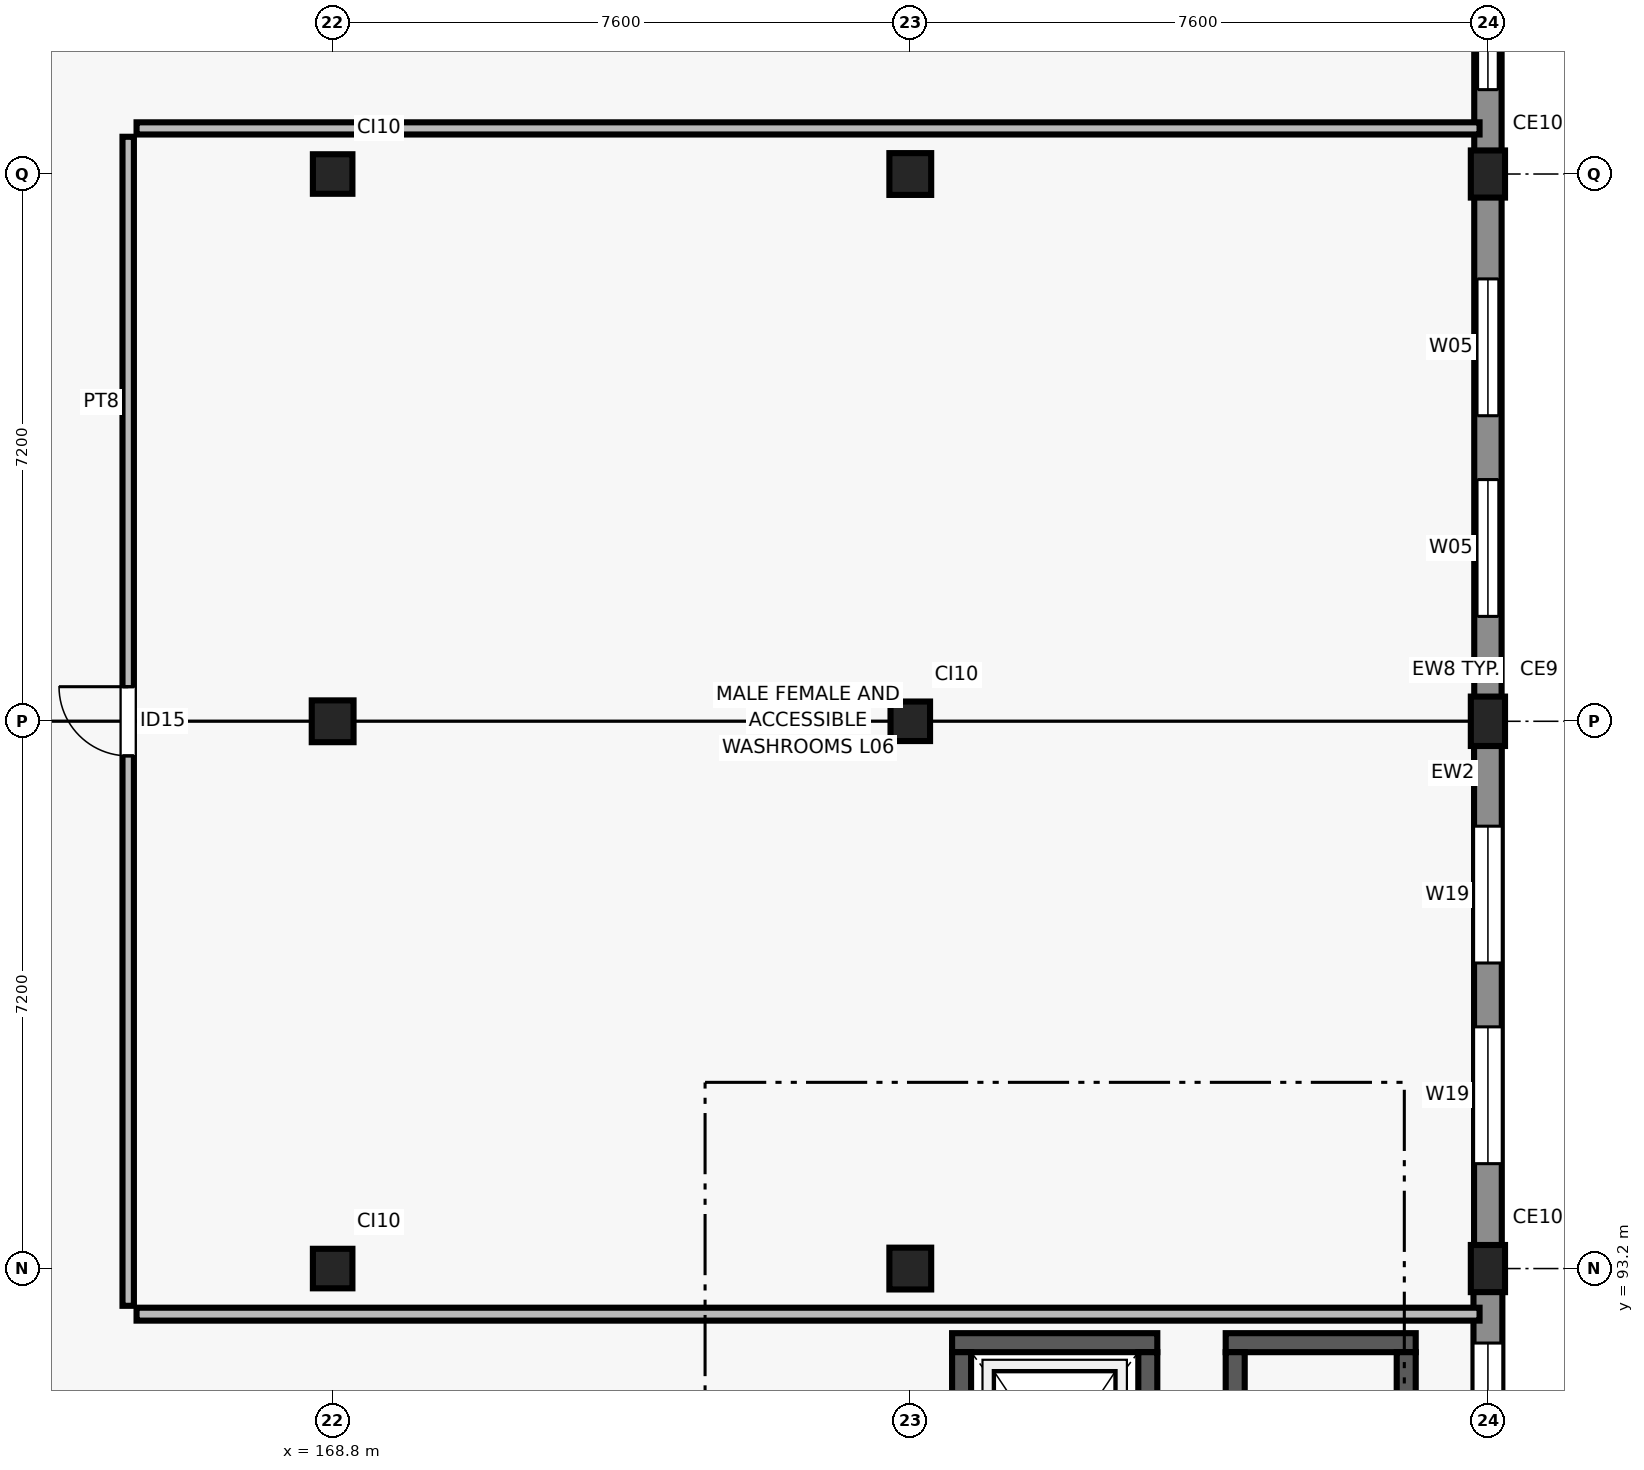
"""IFC4 building model, lengths in metres.
Left out: names, types, materials, properties, quantities, classifications, styles, units other than length and angle.
Written with IfcOpenShell. Run it as: python <this file> out.ifc"""

import sys

from ifc_helpers import new_model, si_unit, direction, frame, frame_2d, origin, origin_2d, place, context, subcontext, project, spatial, polyline, rectangle, outline, extrude, element, fill, save


model = new_model("IFC4")
c1 = context("Model", 3, precision=1e-05, world=origin(), true_north=direction((0.0, 1.0)))
c2 = subcontext(c1, "Body", "Model", "MODEL_VIEW")
j1 = project(units=[si_unit("LENGTHUNIT", "METRE"), si_unit("PLANEANGLEUNIT", "RADIAN")], contexts=[c1])
p1 = place(None, origin())
s1 = spatial("IfcSite", under=j1, at=p1, CompositionType="ELEMENT")
p2 = place(p1, origin())
s2 = spatial("IfcBuilding", under=s1, at=p2, CompositionType="ELEMENT")
p3 = place(p2, frame((0.0, 0.0, 25.8)))
s3 = spatial("IfcBuildingStorey", under=s2, at=p3, CompositionType="ELEMENT", Elevation=25.8)
p4 = place(p3, frame((168.8, 93.2, 0.0), z_axis=(0.0, 0.0, 1.0), x_axis=(1.0, 0.0, 0.0)))
e1 = element("IfcColumn", 1, at=p4, inside=s3, PredefinedType="COLUMN", context=c2, shape_type="SweptSolid", body=[
    extrude(rectangle(XDim=0.52, YDim=0.52, at=origin_2d()), origin(), (0.0, 0.0, 1.0), 4.2),
])
p5 = place(p3, frame((168.8, 100.4, 0.0), z_axis=(0.0, 0.0, 1.0), x_axis=(1.0, 0.0, 0.0)))
e2 = element("IfcColumn", 2, at=p5, inside=s3, PredefinedType="COLUMN", context=c2, shape_type="SweptSolid", body=[
    extrude(rectangle(XDim=0.55, YDim=0.55, at=origin_2d()), origin(), (0.0, 0.0, 1.0), 4.2),
])
p6 = place(p3, frame((168.8, 107.6, 0.0), z_axis=(0.0, 0.0, 1.0), x_axis=(1.0, 0.0, 0.0)))
e3 = element("IfcColumn", 3, at=p6, inside=s3, PredefinedType="COLUMN", context=c2, shape_type="SweptSolid", body=[
    extrude(rectangle(XDim=0.52, YDim=0.52, at=origin_2d()), origin(), (0.0, 0.0, 1.0), 4.2),
])
p7 = place(p3, frame((176.4, 93.2, 0.0), z_axis=(0.0, 0.0, 1.0), x_axis=(1.0, 0.0, 0.0)))
e4 = element("IfcColumn", 4, at=p7, inside=s3, PredefinedType="COLUMN", context=c2, shape_type="SweptSolid", body=[
    extrude(rectangle(XDim=0.55, YDim=0.55, at=origin_2d()), origin(), (0.0, 0.0, 1.0), 4.2),
])
p8 = place(p3, frame((176.4, 100.4, 0.0), z_axis=(0.0, 0.0, 1.0), x_axis=(1.0, 0.0, 0.0)))
e5 = element("IfcColumn", 5, at=p8, inside=s3, PredefinedType="COLUMN", context=c2, shape_type="SweptSolid", body=[
    extrude(rectangle(XDim=0.52, YDim=0.52, at=origin_2d()), origin(), (0.0, 0.0, 1.0), 4.2),
])
p9 = place(p3, frame((176.4, 107.6, 0.0), z_axis=(0.0, 0.0, 1.0), x_axis=(1.0, 0.0, 0.0)))
e6 = element("IfcColumn", 6, at=p9, inside=s3, PredefinedType="COLUMN", context=c2, shape_type="SweptSolid", body=[
    extrude(rectangle(XDim=0.55, YDim=0.55, at=origin_2d()), origin(), (0.0, 0.0, 1.0), 4.2),
])
p10 = place(p3, frame((184.0, 93.2, 0.0), z_axis=(0.0, 0.0, 1.0), x_axis=(1.0, 0.0, 0.0)))
e7 = element("IfcColumn", 7, at=p10, inside=s3, PredefinedType="COLUMN", context=c2, shape_type="SweptSolid", body=[
    extrude(rectangle(XDim=0.62, YDim=0.45, at=origin_2d()), origin(), (0.0, 0.0, 1.0), 4.2),
])
p11 = place(p3, frame((184.0, 100.4, 0.0), z_axis=(0.0, 0.0, 1.0), x_axis=(1.0, 0.0, 0.0)))
e8 = element("IfcColumn", 8, at=p11, inside=s3, PredefinedType="COLUMN", context=c2, shape_type="SweptSolid", body=[
    extrude(rectangle(XDim=0.65, YDim=0.45, at=origin_2d()), origin(), (0.0, 0.0, 1.0), 4.2),
])
p12 = place(p3, frame((184.0, 107.6, 0.0), z_axis=(0.0, 0.0, 1.0), x_axis=(1.0, 0.0, 0.0)))
e9 = element("IfcColumn", 9, at=p12, inside=s3, PredefinedType="COLUMN", context=c2, shape_type="SweptSolid", body=[
    extrude(rectangle(XDim=0.62, YDim=0.45, at=origin_2d()), origin(), (0.0, 0.0, 1.0), 4.2),
])
p13 = place(p3, frame((184.0, 100.62, 0.0), z_axis=(0.0, 0.0, 1.0), x_axis=(0.0, 1.0, 0.0)))
e10 = element("IfcWall", 10, at=p13, inside=s3, PredefinedType="SOLIDWALL", context=c2, shape_type="SweptSolid", body=[
    extrude(rectangle(XDim=6.76, YDim=0.275, at=frame_2d((3.38, 0.0))), origin(), (0.0, 0.0, 1.0), 3.355),
])
p14 = place(p13, frame((1.16, 0.0, 0.9)))
e11 = element("IfcOpeningElement", 11, at=p14, cuts=e10, PredefinedType="OPENING", context=c2, shape_type="SweptSolid", body=[
    extrude(rectangle(XDim=1.8, YDim=1.8, at=frame_2d((0.9, 0.9))), frame((0.0, 0.147, 0.0), z_axis=(0.0, -1.0, 0.0), x_axis=(1.0, 0.0, 0.0)), (0.0, 0.0, 1.0), 0.295),
])
p15 = place(p13, frame((3.8, 0.0, 0.9)))
e12 = element("IfcOpeningElement", 12, at=p15, cuts=e10, PredefinedType="OPENING", context=c2, shape_type="SweptSolid", body=[
    extrude(rectangle(XDim=1.8, YDim=1.8, at=frame_2d((0.9, 0.9))), frame((0.0, 0.147, 0.0), z_axis=(0.0, -1.0, 0.0), x_axis=(1.0, 0.0, 0.0)), (0.0, 0.0, 1.0), 0.295),
])
p16 = place(p3, frame((184.0, 107.82, 0.0), z_axis=(0.0, 0.0, 1.0), x_axis=(0.0, 1.0, 0.0)))
e13 = element("IfcWall", 13, at=p16, inside=s3, PredefinedType="SOLIDWALL", context=c2, shape_type="SweptSolid", body=[
    extrude(rectangle(XDim=6.76, YDim=0.26, at=frame_2d((3.38, 0.0))), origin(), (0.0, 0.0, 1.0), 3.395),
])
p17 = place(p16, frame((0.89, 0.0, 0.9)))
e14 = element("IfcOpeningElement", 14, at=p17, cuts=e13, PredefinedType="OPENING", context=c2, shape_type="SweptSolid", body=[
    extrude(rectangle(XDim=1.4, YDim=1.8, at=frame_2d((0.7, 0.9))), frame((0.0, 0.14, 0.0), z_axis=(0.0, -1.0, 0.0), x_axis=(1.0, 0.0, 0.0)), (0.0, 0.0, 1.0), 0.28),
])
p18 = place(p16, frame((4.37, 0.0, 0.9)))
e15 = element("IfcOpeningElement", 15, at=p18, cuts=e13, PredefinedType="OPENING", context=c2, shape_type="SweptSolid", body=[
    extrude(rectangle(XDim=1.2, YDim=1.8, at=frame_2d((0.6, 0.9))), frame((0.0, 0.14, 0.0), z_axis=(0.0, -1.0, 0.0), x_axis=(1.0, 0.0, 0.0)), (0.0, 0.0, 1.0), 0.28),
])
p19 = place(p3, frame((184.0, 86.22, 0.0), z_axis=(0.0, 0.0, 1.0), x_axis=(0.0, 1.0, 0.0)))
e16 = element("IfcWall", 16, at=p19, inside=s3, PredefinedType="SOLIDWALL", context=c2, shape_type="SweptSolid", body=[
    extrude(rectangle(XDim=6.76, YDim=0.38, at=frame_2d((3.38, 0.0))), origin(), (0.0, 0.0, 1.0), 3.515),
])
p20 = place(p19, frame((0.76, 0.0, 0.9)))
e17 = element("IfcOpeningElement", 17, at=p20, cuts=e16, PredefinedType="OPENING", context=c2, shape_type="SweptSolid", body=[
    extrude(rectangle(XDim=2.4, YDim=1.25, at=frame_2d((1.2, 0.625))), frame((0.0, 0.2, 0.0), z_axis=(0.0, -1.0, 0.0), x_axis=(1.0, 0.0, 0.0)), (0.0, 0.0, 1.0), 0.4),
])
p21 = place(p19, frame((3.6, 0.0, 0.9)))
e18 = element("IfcOpeningElement", 18, at=p21, cuts=e16, PredefinedType="OPENING", context=c2, shape_type="SweptSolid", body=[
    extrude(rectangle(XDim=2.4, YDim=1.25, at=frame_2d((1.2, 0.625))), frame((0.0, 0.2, 0.0), z_axis=(0.0, -1.0, 0.0), x_axis=(1.0, 0.0, 0.0)), (0.0, 0.0, 1.0), 0.4),
])
p22 = place(p3, frame((184.0, 93.42, 0.0), z_axis=(0.0, 0.0, 1.0), x_axis=(0.0, 1.0, 0.0)))
e19 = element("IfcWall", 19, at=p22, inside=s3, PredefinedType="SOLIDWALL", context=c2, shape_type="SweptSolid", body=[
    extrude(rectangle(XDim=6.76, YDim=0.365, at=frame_2d((3.38, 0.0))), origin(), (0.0, 0.0, 1.0), 3.535),
])
p23 = place(p22, frame((1.16, 0.0, 0.9)))
e20 = element("IfcOpeningElement", 20, at=p23, cuts=e19, PredefinedType="OPENING", context=c2, shape_type="SweptSolid", body=[
    extrude(rectangle(XDim=1.8, YDim=1.25, at=frame_2d((0.9, 0.625))), frame((0.0, 0.192, 0.0), z_axis=(0.0, -1.0, 0.0), x_axis=(1.0, 0.0, 0.0)), (0.0, 0.0, 1.0), 0.385),
])
p24 = place(p22, frame((3.8, 0.0, 0.9)))
e21 = element("IfcOpeningElement", 21, at=p24, cuts=e19, PredefinedType="OPENING", context=c2, shape_type="SweptSolid", body=[
    extrude(rectangle(XDim=1.8, YDim=1.25, at=frame_2d((0.9, 0.625))), frame((0.0, 0.192, 0.0), z_axis=(0.0, -1.0, 0.0), x_axis=(1.0, 0.0, 0.0)), (0.0, 0.0, 1.0), 0.385),
])
p25 = place(p3, frame((184.0, 100.4, 4.2), z_axis=(0.0, 0.0, 1.0), x_axis=(0.0, 1.0, 0.0)))
e22 = element("IfcWall", 22, at=p25, inside=s3, PredefinedType="PARAPET", context=c2, shape_type="SweptSolid", body=[
    extrude(outline(polyline([(0.0, 0.0), (21.6, 0.0), (21.6, 4.4), (20.25, 4.08), (18.9, 3.797), (17.55, 3.551), (16.2, 3.342), (14.85, 3.169), (13.5, 3.032), (12.15, 2.93), (10.8, 2.864), (9.45, 2.833), (8.1, 2.836), (6.75, 2.875), (5.4, 2.949), (4.05, 3.058), (2.7, 3.203), (1.35, 3.383), (0.0, 3.6), (0.0, 0.0)])), frame((0.0, 0.18, 0.0), z_axis=(0.0, -1.0, 0.0), x_axis=(1.0, 0.0, 0.0)), (0.0, 0.0, 1.0), 0.36),
])
p26 = place(p3, frame((176.95, 92.225, 0.0), z_axis=(0.0, 0.0, 1.0), x_axis=(1.0, 0.0, 0.0)))
e23 = element("IfcWall", 23, at=p26, inside=s3, PredefinedType="SHEAR", context=c2, shape_type="SweptSolid", body=[
    extrude(rectangle(XDim=2.7, YDim=0.25, at=frame_2d((1.35, 0.0))), origin(), (0.0, 0.0, 1.0), 3.92),
])
for number, where, z_axis, x_axis in (
    (24, (177.075, 89.2, 0.0), (0.0, 0.0, 1.0), (0.0, 1.0, 0.0)),
    (25, (179.525, 89.2, 0.0), (0.0, 0.0, 1.0), (0.0, 1.0, 0.0)),
):
    element("IfcWall", number, at=place(p3, frame(where, z_axis=z_axis, x_axis=x_axis)), inside=s3, PredefinedType="SHEAR", context=c2, shape_type="SweptSolid", body=[
        extrude(rectangle(XDim=2.9, YDim=0.25, at=frame_2d((1.45, 0.0))), origin(), (0.0, 0.0, 1.0), 3.92),
    ])
p27 = place(p3, frame((180.55, 92.225, 0.0), z_axis=(0.0, 0.0, 1.0), x_axis=(1.0, 0.0, 0.0)))
e26 = element("IfcWall", 26, at=p27, inside=s3, PredefinedType="SHEAR", context=c2, shape_type="SweptSolid", body=[
    extrude(rectangle(XDim=2.5, YDim=0.25, at=frame_2d((1.25, 0.0))), origin(), (0.0, 0.0, 1.0), 3.92),
])
for number, where, z_axis, x_axis in (
    (27, (180.675, 89.2, 0.0), (0.0, 0.0, 1.0), (0.0, 1.0, 0.0)),
    (28, (182.925, 89.2, 0.0), (0.0, 0.0, 1.0), (0.0, 1.0, 0.0)),
):
    element("IfcWall", number, at=place(p3, frame(where, z_axis=z_axis, x_axis=x_axis)), inside=s3, PredefinedType="SHEAR", context=c2, shape_type="SweptSolid", body=[
        extrude(rectangle(XDim=2.9, YDim=0.25, at=frame_2d((1.45, 0.0))), origin(), (0.0, 0.0, 1.0), 3.92),
    ])
p28 = place(p3, frame((166.22, 92.6, 0.0), z_axis=(0.0, 0.0, 1.0), x_axis=(1.0, 0.0, 0.0)))
e29 = element("IfcWall", 29, at=p28, inside=s3, PredefinedType="PARTITIONING", context=c2, shape_type="SweptSolid", body=[
    extrude(rectangle(XDim=17.67, YDim=0.17, at=frame_2d((8.835, 0.0))), origin(), (0.0, 0.0, 1.0), 3.9),
])
p29 = place(p3, frame((166.22, 108.2, 0.0), z_axis=(0.0, 0.0, 1.0), x_axis=(1.0, 0.0, 0.0)))
e30 = element("IfcWall", 30, at=p29, inside=s3, PredefinedType="PARTITIONING", context=c2, shape_type="SweptSolid", body=[
    extrude(rectangle(XDim=17.67, YDim=0.16, at=frame_2d((8.835, 0.0))), origin(), (0.0, 0.0, 1.0), 3.9),
])
p30 = place(p3, frame((166.11, 92.71, 0.0), z_axis=(0.0, 0.0, 1.0), x_axis=(0.0, 1.0, 0.0)))
e31 = element("IfcWall", 31, at=p30, inside=s3, PredefinedType="PARTITIONING", context=c2, shape_type="SweptSolid", body=[
    extrude(rectangle(XDim=15.38, YDim=0.15, at=frame_2d((7.69, 0.0))), origin(), (0.0, 0.0, 1.0), 3.9),
])
p31 = place(p30, frame((7.235, 0.0, 0.0)))
e32 = element("IfcOpeningElement", 32, at=p31, cuts=e31, PredefinedType="OPENING", context=c2, shape_type="SweptSolid", body=[
    extrude(rectangle(XDim=0.91, YDim=2.1, at=frame_2d((0.455, 1.05))), frame((0.0, 0.085, 0.0), z_axis=(0.0, -1.0, 0.0), x_axis=(1.0, 0.0, 0.0)), (0.0, 0.0, 1.0), 0.17),
])
p32 = place(p14, origin())
e33 = element("IfcWindow", 33, at=p32, inside=s3, PartitioningType="SINGLE_PANEL", PredefinedType="WINDOW", context=c2, shape_type="SweptSolid", body=[
    extrude(rectangle(XDim=1.8, YDim=1.8, at=frame_2d((0.9, 0.9))), frame((0.0, 0.03, 0.0), z_axis=(0.0, -1.0, 0.0), x_axis=(1.0, 0.0, 0.0)), (0.0, 0.0, 1.0), 0.06),
])
fill(e11, e33)
p33 = place(p15, origin())
e34 = element("IfcWindow", 34, at=p33, inside=s3, PartitioningType="SINGLE_PANEL", PredefinedType="WINDOW", context=c2, shape_type="SweptSolid", body=[
    extrude(rectangle(XDim=1.8, YDim=1.8, at=frame_2d((0.9, 0.9))), frame((0.0, 0.03, 0.0), z_axis=(0.0, -1.0, 0.0), x_axis=(1.0, 0.0, 0.0)), (0.0, 0.0, 1.0), 0.06),
])
fill(e12, e34)
p34 = place(p17, origin())
e35 = element("IfcWindow", 35, at=p34, inside=s3, PartitioningType="SINGLE_PANEL", PredefinedType="WINDOW", context=c2, shape_type="SweptSolid", body=[
    extrude(rectangle(XDim=1.4, YDim=1.8, at=frame_2d((0.7, 0.9))), frame((0.0, 0.03, 0.0), z_axis=(0.0, -1.0, 0.0), x_axis=(1.0, 0.0, 0.0)), (0.0, 0.0, 1.0), 0.06),
])
fill(e14, e35)
p35 = place(p21, origin())
e36 = element("IfcWindow", 36, at=p35, inside=s3, PartitioningType="SINGLE_PANEL", PredefinedType="WINDOW", context=c2, shape_type="SweptSolid", body=[
    extrude(rectangle(XDim=2.4, YDim=1.25, at=frame_2d((1.2, 0.625))), frame((0.0, 0.03, 0.0), z_axis=(0.0, -1.0, 0.0), x_axis=(1.0, 0.0, 0.0)), (0.0, 0.0, 1.0), 0.06),
])
fill(e18, e36)
p36 = place(p23, origin())
e37 = element("IfcWindow", 37, at=p36, inside=s3, PartitioningType="SINGLE_PANEL", PredefinedType="WINDOW", context=c2, shape_type="SweptSolid", body=[
    extrude(rectangle(XDim=1.8, YDim=1.25, at=frame_2d((0.9, 0.625))), frame((0.0, 0.03, 0.0), z_axis=(0.0, -1.0, 0.0), x_axis=(1.0, 0.0, 0.0)), (0.0, 0.0, 1.0), 0.06),
])
fill(e20, e37)
p37 = place(p24, origin())
e38 = element("IfcWindow", 38, at=p37, inside=s3, PartitioningType="SINGLE_PANEL", PredefinedType="WINDOW", context=c2, shape_type="SweptSolid", body=[
    extrude(rectangle(XDim=1.8, YDim=1.25, at=frame_2d((0.9, 0.625))), frame((0.0, 0.03, 0.0), z_axis=(0.0, -1.0, 0.0), x_axis=(1.0, 0.0, 0.0)), (0.0, 0.0, 1.0), 0.06),
])
fill(e21, e38)
p38 = place(p31, origin())
e39 = element("IfcDoor", 39, at=p38, inside=s3, OperationType="SINGLE_SWING_RIGHT", PredefinedType="DOOR", context=c2, shape_type="SweptSolid", body=[
    extrude(rectangle(XDim=0.91, YDim=2.1, at=frame_2d((0.455, 1.05))), frame((0.0, 0.025, 0.0), z_axis=(0.0, -1.0, 0.0), x_axis=(1.0, 0.0, 0.0)), (0.0, 0.0, 1.0), 0.05),
])
fill(e32, e39)
save(model, sys.argv[1])
